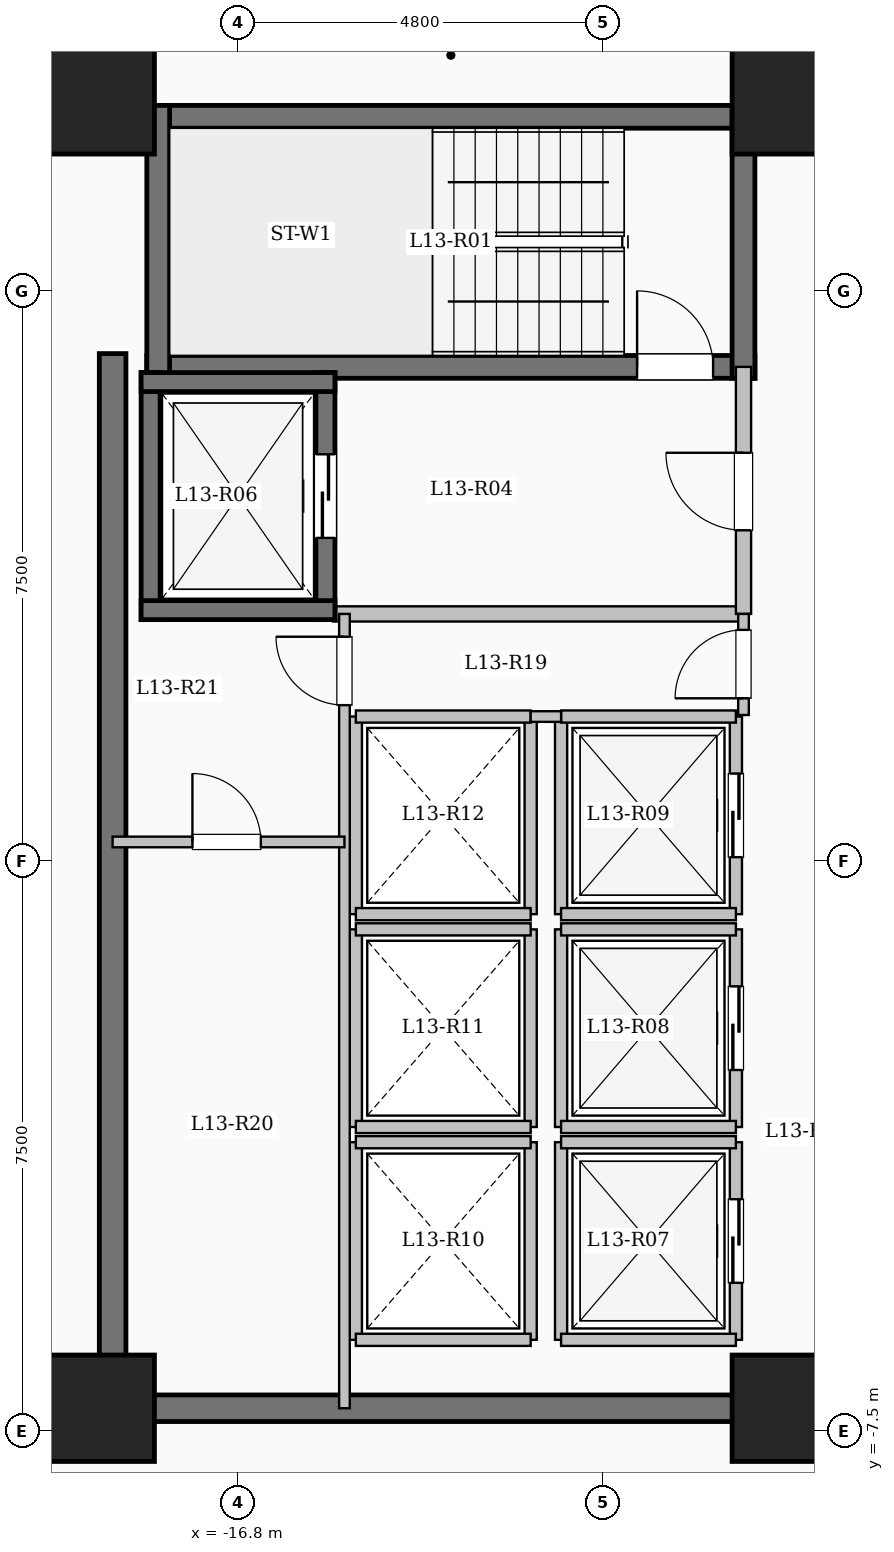
"""IFC4 building model, lengths in metres.
Left out: names, types, materials, properties, quantities, classifications, styles, units other than length and angle.
Written with IfcOpenShell. Run it as: python <this file> out.ifc"""

import sys

from ifc_helpers import new_model, si_unit, direction, frame, frame_2d, origin, origin_2d, place, context, subcontext, project, spatial, rectangle, extrude, element, fill, save


model = new_model("IFC4")
c1 = context("Model", 3, precision=1e-05, world=origin(), true_north=direction((0.0, 1.0)))
c2 = subcontext(c1, "Body", "Model", "MODEL_VIEW")
j1 = project(units=[si_unit("LENGTHUNIT", "METRE"), si_unit("PLANEANGLEUNIT", "RADIAN")], contexts=[c1])
p1 = place(None, origin())
s1 = spatial("IfcSite", under=j1, at=p1, CompositionType="ELEMENT")
p2 = place(p1, origin())
s2 = spatial("IfcBuilding", under=s1, at=p2, CompositionType="ELEMENT")
p3 = place(p2, frame((0.0, 0.0, 50.8)))
s3 = spatial("IfcBuildingStorey", under=s2, at=p3, CompositionType="ELEMENT", Elevation=50.8)
for number, where, z_axis, x_axis in (
    (1, (-9.6, -7.2, 0.0), (0.0, 0.0, 1.0), (1.0, 0.0, 0.0)),
    (2, (-9.6, 10.0, 0.0), (0.0, 0.0, 1.0), (1.0, 0.0, 0.0)),
    (3, (-18.6, -7.2, 0.0), (0.0, 0.0, 1.0), (1.0, 0.0, 0.0)),
    (4, (-18.6, 10.0, 0.0), (0.0, 0.0, 1.0), (1.0, 0.0, 0.0)),
):
    element("IfcColumn", number, at=place(p3, frame(where, z_axis=z_axis, x_axis=x_axis)), inside=s3, PredefinedType="COLUMN", context=c2, shape_type="SweptSolid", body=[
        extrude(rectangle(XDim=1.4, YDim=1.4, at=origin_2d()), origin(), (0.0, 0.0, 1.0), 3.35),
    ])
p4 = place(p3, frame((-18.0, 9.79, 0.0), z_axis=(0.0, 0.0, 1.0), x_axis=(1.0, 0.0, 0.0)))
e5 = element("IfcWall", 5, at=p4, inside=s3, PredefinedType="SHEAR", context=c2, shape_type="SweptSolid", body=[
    extrude(rectangle(XDim=8.0, YDim=0.3, at=frame_2d((4.0, 0.0))), origin(), (0.0, 0.0, 1.0), 3.35),
])
p5 = place(p3, frame((-18.0, 6.5, 0.0), z_axis=(0.0, 0.0, 1.0), x_axis=(1.0, 0.0, 0.0)))
e6 = element("IfcWall", 6, at=p5, inside=s3, PredefinedType="SHEAR", context=c2, shape_type="SweptSolid", body=[
    extrude(rectangle(XDim=8.0, YDim=0.3, at=frame_2d((4.0, 0.0))), origin(), (0.0, 0.0, 1.0), 3.35),
])
p6 = place(p5, frame((6.45, 0.0, 0.0)))
e7 = element("IfcOpeningElement", 7, at=p6, cuts=e6, PredefinedType="OPENING", context=c2, shape_type="SweptSolid", body=[
    extrude(rectangle(XDim=1.0, YDim=2.15, at=frame_2d((0.5, 1.075))), frame((0.0, 0.16, 0.0), z_axis=(0.0, -1.0, 0.0), x_axis=(1.0, 0.0, 0.0)), (0.0, 0.0, 1.0), 0.32),
])
for number, where, z_axis, x_axis in (
    (8, (-17.85, 6.35, 0.0), (0.0, 0.0, 1.0), (0.0, 1.0, 0.0)),
    (9, (-10.15, 6.35, 0.0), (0.0, 0.0, 1.0), (0.0, 1.0, 0.0)),
):
    element("IfcWall", number, at=place(p3, frame(where, z_axis=z_axis, x_axis=x_axis)), inside=s3, PredefinedType="SHEAR", context=c2, shape_type="SweptSolid", body=[
        extrude(rectangle(XDim=3.59, YDim=0.3, at=frame_2d((1.795, 0.0))), origin(), (0.0, 0.0, 1.0), 3.35),
    ])
p7 = place(p3, frame((-15.55, 3.25, 0.0), z_axis=(0.0, 0.0, 1.0), x_axis=(1.0, 0.0, 0.0)))
e10 = element("IfcWall", 10, at=p7, inside=s3, PredefinedType="SOLIDWALL", context=c2, shape_type="SweptSolid", body=[
    extrude(rectangle(XDim=5.4, YDim=0.2, at=frame_2d((2.7, 0.0))), origin(), (0.0, 0.0, 1.0), 3.1),
])
p8 = place(p3, frame((-10.15, 3.25, 0.0), z_axis=(0.0, 0.0, 1.0), x_axis=(0.0, 1.0, 0.0)))
e11 = element("IfcWall", 11, at=p8, inside=s3, PredefinedType="SOLIDWALL", context=c2, shape_type="SweptSolid", body=[
    extrude(rectangle(XDim=3.25, YDim=0.2, at=frame_2d((1.625, 0.0))), origin(), (0.0, 0.0, 1.0), 3.1),
])
p9 = place(p8, frame((1.1, 0.0, 0.0)))
e12 = element("IfcOpeningElement", 12, at=p9, cuts=e11, PredefinedType="OPENING", context=c2, shape_type="SweptSolid", body=[
    extrude(rectangle(XDim=1.02, YDim=2.15, at=frame_2d((0.51, 1.075))), frame((0.0, 0.11, 0.0), z_axis=(0.0, -1.0, 0.0), x_axis=(1.0, 0.0, 0.0)), (0.0, 0.0, 1.0), 0.22),
])
p10 = place(p3, frame((-17.95, 3.175, 0.0), z_axis=(0.0, 0.0, 1.0), x_axis=(0.0, 1.0, 0.0)))
e13 = element("IfcWall", 13, at=p10, inside=s3, PredefinedType="SHEAR", context=c2, shape_type="SweptSolid", body=[
    extrude(rectangle(XDim=3.25, YDim=0.25, at=frame_2d((1.625, 0.0))), origin(), (0.0, 0.0, 1.0), 3.35),
])
p11 = place(p3, frame((-15.65, 3.175, 0.0), z_axis=(0.0, 0.0, 1.0), x_axis=(0.0, 1.0, 0.0)))
e14 = element("IfcWall", 14, at=p11, inside=s3, PredefinedType="SHEAR", context=c2, shape_type="SweptSolid", body=[
    extrude(rectangle(XDim=3.25, YDim=0.25, at=frame_2d((1.625, 0.0))), origin(), (0.0, 0.0, 1.0), 3.35),
])
p12 = place(p11, frame((1.075, 0.0, 0.0)))
e15 = element("IfcOpeningElement", 15, at=p12, cuts=e14, PredefinedType="OPENING", context=c2, shape_type="SweptSolid", body=[
    extrude(rectangle(XDim=1.1, YDim=2.15, at=frame_2d((0.55, 1.075))), frame((0.0, 0.135, 0.0), z_axis=(0.0, -1.0, 0.0), x_axis=(1.0, 0.0, 0.0)), (0.0, 0.0, 1.0), 0.27),
])
for number, where, z_axis, x_axis in (
    (16, (-18.075, 3.3, 0.0), (0.0, 0.0, 1.0), (1.0, 0.0, 0.0)),
    (17, (-18.075, 6.3, 0.0), (0.0, 0.0, 1.0), (1.0, 0.0, 0.0)),
):
    element("IfcWall", number, at=place(p3, frame(where, z_axis=z_axis, x_axis=x_axis)), inside=s3, PredefinedType="SHEAR", context=c2, shape_type="SweptSolid", body=[
        extrude(rectangle(XDim=2.55, YDim=0.25, at=frame_2d((1.275, 0.0))), origin(), (0.0, 0.0, 1.0), 3.35),
    ])
p13 = place(p3, frame((-12.55, -6.3, 0.0), z_axis=(0.0, 0.0, 1.0), x_axis=(0.0, 1.0, 0.0)))
e18 = element("IfcWall", 18, at=p13, inside=s3, PredefinedType="SOLIDWALL", context=c2, shape_type="SweptSolid", body=[
    extrude(rectangle(XDim=2.6, YDim=0.16, at=frame_2d((1.3, 0.0))), origin(), (0.0, 0.0, 1.0), 3.1),
])
p14 = place(p3, frame((-10.25, -6.3, 0.0), z_axis=(0.0, 0.0, 1.0), x_axis=(0.0, 1.0, 0.0)))
e19 = element("IfcWall", 19, at=p14, inside=s3, PredefinedType="SOLIDWALL", context=c2, shape_type="SweptSolid", body=[
    extrude(rectangle(XDim=2.6, YDim=0.16, at=frame_2d((1.3, 0.0))), origin(), (0.0, 0.0, 1.0), 3.1),
])
p15 = place(p14, frame((0.75, 0.0, 0.0)))
e20 = element("IfcOpeningElement", 20, at=p15, cuts=e19, PredefinedType="OPENING", context=c2, shape_type="SweptSolid", body=[
    extrude(rectangle(XDim=1.1, YDim=2.15, at=frame_2d((0.55, 1.075))), frame((0.0, 0.09, 0.0), z_axis=(0.0, -1.0, 0.0), x_axis=(1.0, 0.0, 0.0)), (0.0, 0.0, 1.0), 0.18),
])
for number, where, z_axis, x_axis in (
    (21, (-12.55, -6.3, 0.0), (0.0, 0.0, 1.0), (1.0, 0.0, 0.0)),
    (22, (-12.55, -3.7, 0.0), (0.0, 0.0, 1.0), (1.0, 0.0, 0.0)),
):
    element("IfcWall", number, at=place(p3, frame(where, z_axis=z_axis, x_axis=x_axis)), inside=s3, PredefinedType="SOLIDWALL", context=c2, shape_type="SweptSolid", body=[
        extrude(rectangle(XDim=2.3, YDim=0.16, at=frame_2d((1.15, 0.0))), origin(), (0.0, 0.0, 1.0), 3.1),
    ])
p16 = place(p3, frame((-12.55, -3.5, 0.0), z_axis=(0.0, 0.0, 1.0), x_axis=(0.0, 1.0, 0.0)))
e23 = element("IfcWall", 23, at=p16, inside=s3, PredefinedType="SOLIDWALL", context=c2, shape_type="SweptSolid", body=[
    extrude(rectangle(XDim=2.6, YDim=0.16, at=frame_2d((1.3, 0.0))), origin(), (0.0, 0.0, 1.0), 3.1),
])
p17 = place(p3, frame((-10.25, -3.5, 0.0), z_axis=(0.0, 0.0, 1.0), x_axis=(0.0, 1.0, 0.0)))
e24 = element("IfcWall", 24, at=p17, inside=s3, PredefinedType="SOLIDWALL", context=c2, shape_type="SweptSolid", body=[
    extrude(rectangle(XDim=2.6, YDim=0.16, at=frame_2d((1.3, 0.0))), origin(), (0.0, 0.0, 1.0), 3.1),
])
p18 = place(p17, frame((0.75, 0.0, 0.0)))
e25 = element("IfcOpeningElement", 25, at=p18, cuts=e24, PredefinedType="OPENING", context=c2, shape_type="SweptSolid", body=[
    extrude(rectangle(XDim=1.1, YDim=2.15, at=frame_2d((0.55, 1.075))), frame((0.0, 0.09, 0.0), z_axis=(0.0, -1.0, 0.0), x_axis=(1.0, 0.0, 0.0)), (0.0, 0.0, 1.0), 0.18),
])
for number, where, z_axis, x_axis in (
    (26, (-12.55, -3.5, 0.0), (0.0, 0.0, 1.0), (1.0, 0.0, 0.0)),
    (27, (-12.55, -0.9, 0.0), (0.0, 0.0, 1.0), (1.0, 0.0, 0.0)),
):
    element("IfcWall", number, at=place(p3, frame(where, z_axis=z_axis, x_axis=x_axis)), inside=s3, PredefinedType="SOLIDWALL", context=c2, shape_type="SweptSolid", body=[
        extrude(rectangle(XDim=2.3, YDim=0.16, at=frame_2d((1.15, 0.0))), origin(), (0.0, 0.0, 1.0), 3.1),
    ])
p19 = place(p3, frame((-12.55, -0.7, 0.0), z_axis=(0.0, 0.0, 1.0), x_axis=(0.0, 1.0, 0.0)))
e28 = element("IfcWall", 28, at=p19, inside=s3, PredefinedType="SOLIDWALL", context=c2, shape_type="SweptSolid", body=[
    extrude(rectangle(XDim=2.6, YDim=0.16, at=frame_2d((1.3, 0.0))), origin(), (0.0, 0.0, 1.0), 3.1),
])
p20 = place(p3, frame((-10.25, -0.7, 0.0), z_axis=(0.0, 0.0, 1.0), x_axis=(0.0, 1.0, 0.0)))
e29 = element("IfcWall", 29, at=p20, inside=s3, PredefinedType="SOLIDWALL", context=c2, shape_type="SweptSolid", body=[
    extrude(rectangle(XDim=2.6, YDim=0.16, at=frame_2d((1.3, 0.0))), origin(), (0.0, 0.0, 1.0), 3.1),
])
p21 = place(p20, frame((0.75, 0.0, 0.0)))
e30 = element("IfcOpeningElement", 30, at=p21, cuts=e29, PredefinedType="OPENING", context=c2, shape_type="SweptSolid", body=[
    extrude(rectangle(XDim=1.1, YDim=2.15, at=frame_2d((0.55, 1.075))), frame((0.0, 0.09, 0.0), z_axis=(0.0, -1.0, 0.0), x_axis=(1.0, 0.0, 0.0)), (0.0, 0.0, 1.0), 0.18),
])
for number, where, z_axis, x_axis in (
    (31, (-12.55, -0.7, 0.0), (0.0, 0.0, 1.0), (1.0, 0.0, 0.0)),
    (32, (-12.55, 1.9, 0.0), (0.0, 0.0, 1.0), (1.0, 0.0, 0.0)),
):
    element("IfcWall", number, at=place(p3, frame(where, z_axis=z_axis, x_axis=x_axis)), inside=s3, PredefinedType="SOLIDWALL", context=c2, shape_type="SweptSolid", body=[
        extrude(rectangle(XDim=2.3, YDim=0.16, at=frame_2d((1.15, 0.0))), origin(), (0.0, 0.0, 1.0), 3.1),
    ])
for number, where, z_axis, x_axis in (
    (33, (-15.25, -6.3, 0.0), (0.0, 0.0, 1.0), (0.0, 1.0, 0.0)),
    (34, (-12.95, -6.3, 0.0), (0.0, 0.0, 1.0), (0.0, 1.0, 0.0)),
):
    element("IfcWall", number, at=place(p3, frame(where, z_axis=z_axis, x_axis=x_axis)), inside=s3, PredefinedType="SOLIDWALL", context=c2, shape_type="SweptSolid", body=[
        extrude(rectangle(XDim=2.6, YDim=0.16, at=frame_2d((1.3, 0.0))), origin(), (0.0, 0.0, 1.0), 3.1),
    ])
for number, where, z_axis, x_axis in (
    (35, (-15.25, -6.3, 0.0), (0.0, 0.0, 1.0), (1.0, 0.0, 0.0)),
    (36, (-15.25, -3.7, 0.0), (0.0, 0.0, 1.0), (1.0, 0.0, 0.0)),
):
    element("IfcWall", number, at=place(p3, frame(where, z_axis=z_axis, x_axis=x_axis)), inside=s3, PredefinedType="SOLIDWALL", context=c2, shape_type="SweptSolid", body=[
        extrude(rectangle(XDim=2.3, YDim=0.16, at=frame_2d((1.15, 0.0))), origin(), (0.0, 0.0, 1.0), 3.1),
    ])
for number, where, z_axis, x_axis in (
    (37, (-15.25, -3.5, 0.0), (0.0, 0.0, 1.0), (0.0, 1.0, 0.0)),
    (38, (-12.95, -3.5, 0.0), (0.0, 0.0, 1.0), (0.0, 1.0, 0.0)),
):
    element("IfcWall", number, at=place(p3, frame(where, z_axis=z_axis, x_axis=x_axis)), inside=s3, PredefinedType="SOLIDWALL", context=c2, shape_type="SweptSolid", body=[
        extrude(rectangle(XDim=2.6, YDim=0.16, at=frame_2d((1.3, 0.0))), origin(), (0.0, 0.0, 1.0), 3.1),
    ])
for number, where, z_axis, x_axis in (
    (39, (-15.25, -3.5, 0.0), (0.0, 0.0, 1.0), (1.0, 0.0, 0.0)),
    (40, (-15.25, -0.9, 0.0), (0.0, 0.0, 1.0), (1.0, 0.0, 0.0)),
):
    element("IfcWall", number, at=place(p3, frame(where, z_axis=z_axis, x_axis=x_axis)), inside=s3, PredefinedType="SOLIDWALL", context=c2, shape_type="SweptSolid", body=[
        extrude(rectangle(XDim=2.3, YDim=0.16, at=frame_2d((1.15, 0.0))), origin(), (0.0, 0.0, 1.0), 3.1),
    ])
for number, where, z_axis, x_axis in (
    (41, (-15.25, -0.7, 0.0), (0.0, 0.0, 1.0), (0.0, 1.0, 0.0)),
    (42, (-12.95, -0.7, 0.0), (0.0, 0.0, 1.0), (0.0, 1.0, 0.0)),
):
    element("IfcWall", number, at=place(p3, frame(where, z_axis=z_axis, x_axis=x_axis)), inside=s3, PredefinedType="SOLIDWALL", context=c2, shape_type="SweptSolid", body=[
        extrude(rectangle(XDim=2.6, YDim=0.16, at=frame_2d((1.3, 0.0))), origin(), (0.0, 0.0, 1.0), 3.1),
    ])
for number, where, z_axis, x_axis in (
    (43, (-15.25, -0.7, 0.0), (0.0, 0.0, 1.0), (1.0, 0.0, 0.0)),
    (44, (-15.25, 1.9, 0.0), (0.0, 0.0, 1.0), (1.0, 0.0, 0.0)),
):
    element("IfcWall", number, at=place(p3, frame(where, z_axis=z_axis, x_axis=x_axis)), inside=s3, PredefinedType="SOLIDWALL", context=c2, shape_type="SweptSolid", body=[
        extrude(rectangle(XDim=2.3, YDim=0.16, at=frame_2d((1.15, 0.0))), origin(), (0.0, 0.0, 1.0), 3.1),
    ])
p22 = place(p3, frame((-18.45, -7.375, 0.0), z_axis=(0.0, 0.0, 1.0), x_axis=(0.0, 1.0, 0.0)))
e45 = element("IfcWall", 45, at=p22, inside=s3, PredefinedType="SHEAR", context=c2, shape_type="SweptSolid", body=[
    extrude(rectangle(XDim=14.05, YDim=0.35, at=frame_2d((7.025, 0.0))), origin(), (0.0, 0.0, 1.0), 3.35),
])
p23 = place(p3, frame((-18.625, -7.2, 0.0), z_axis=(0.0, 0.0, 1.0), x_axis=(1.0, 0.0, 0.0)))
e46 = element("IfcWall", 46, at=p23, inside=s3, PredefinedType="SHEAR", context=c2, shape_type="SweptSolid", body=[
    extrude(rectangle(XDim=8.55, YDim=0.35, at=frame_2d((4.275, 0.0))), origin(), (0.0, 0.0, 1.0), 3.35),
])
p24 = place(p3, frame((-12.95, 1.9, 0.0), z_axis=(0.0, 0.0, 1.0), x_axis=(1.0, 0.0, 0.0)))
e47 = element("IfcWall", 47, at=p24, inside=s3, PredefinedType="PARTITIONING", context=c2, shape_type="SweptSolid", body=[
    extrude(rectangle(XDim=0.4, YDim=0.14, at=frame_2d((0.2, 0.0))), origin(), (0.0, 0.0, 1.0), 3.1),
])
p25 = place(p3, frame((-10.15, 1.92, 0.0), z_axis=(0.0, 0.0, 1.0), x_axis=(0.0, 1.0, 0.0)))
e48 = element("IfcWall", 48, at=p25, inside=s3, PredefinedType="PARTITIONING", context=c2, shape_type="SweptSolid", body=[
    extrude(rectangle(XDim=1.33, YDim=0.14, at=frame_2d((0.665, 0.0))), origin(), (0.0, 0.0, 1.0), 3.1),
])
p26 = place(p25, frame((0.22, 0.0, 0.0)))
e49 = element("IfcOpeningElement", 49, at=p26, cuts=e48, PredefinedType="OPENING", context=c2, shape_type="SweptSolid", body=[
    extrude(rectangle(XDim=0.9, YDim=2.08, at=frame_2d((0.45, 1.04))), frame((0.0, 0.08, 0.0), z_axis=(0.0, -1.0, 0.0), x_axis=(1.0, 0.0, 0.0)), (0.0, 0.0, 1.0), 0.16),
])
p27 = place(p3, frame((-15.4, -7.2, 0.0), z_axis=(0.0, 0.0, 1.0), x_axis=(0.0, 1.0, 0.0)))
e50 = element("IfcWall", 50, at=p27, inside=s3, PredefinedType="PARTITIONING", context=c2, shape_type="SweptSolid", body=[
    extrude(rectangle(XDim=10.45, YDim=0.14, at=frame_2d((5.225, 0.0))), origin(), (0.0, 0.0, 1.0), 3.1),
])
p28 = place(p27, frame((9.25, 0.0, 0.0)))
e51 = element("IfcOpeningElement", 51, at=p28, cuts=e50, PredefinedType="OPENING", context=c2, shape_type="SweptSolid", body=[
    extrude(rectangle(XDim=0.9, YDim=2.08, at=frame_2d((0.45, 1.04))), frame((0.0, 0.08, 0.0), z_axis=(0.0, -1.0, 0.0), x_axis=(1.0, 0.0, 0.0)), (0.0, 0.0, 1.0), 0.16),
])
p29 = place(p3, frame((-18.45, 0.25, 0.0), z_axis=(0.0, 0.0, 1.0), x_axis=(1.0, 0.0, 0.0)))
e52 = element("IfcWall", 52, at=p29, inside=s3, PredefinedType="PARTITIONING", context=c2, shape_type="SweptSolid", body=[
    extrude(rectangle(XDim=3.05, YDim=0.14, at=frame_2d((1.525, 0.0))), origin(), (0.0, 0.0, 1.0), 3.1),
])
p30 = place(p29, frame((1.05, 0.0, 0.0)))
e53 = element("IfcOpeningElement", 53, at=p30, cuts=e52, PredefinedType="OPENING", context=c2, shape_type="SweptSolid", body=[
    extrude(rectangle(XDim=0.9, YDim=2.08, at=frame_2d((0.45, 1.04))), frame((0.0, 0.08, 0.0), z_axis=(0.0, -1.0, 0.0), x_axis=(1.0, 0.0, 0.0)), (0.0, 0.0, 1.0), 0.16),
])
p31 = place(p3, frame((-28.68, -7.25, 0.0), z_axis=(0.0, 0.0, 1.0), x_axis=(1.0, 0.0, 0.0)))
e54 = element("IfcWall", 54, at=p31, inside=s3, PredefinedType="PARTITIONING", context=c2, shape_type="SweptSolid", body=[
    extrude(rectangle(XDim=10.23, YDim=0.15, at=frame_2d((5.115, 0.0))), origin(), (0.0, 0.0, 1.0), 3.1),
])
p32 = place(p31, frame((7.03, 0.0, 0.0)))
e55 = element("IfcOpeningElement", 55, at=p32, cuts=e54, PredefinedType="OPENING", context=c2, shape_type="SweptSolid", body=[
    extrude(rectangle(XDim=1.08, YDim=2.15, at=frame_2d((0.54, 1.075))), frame((0.0, 0.085, 0.0), z_axis=(0.0, -1.0, 0.0), x_axis=(1.0, 0.0, 0.0)), (0.0, 0.0, 1.0), 0.17),
])
p33 = place(p6, origin())
e56 = element("IfcDoor", 56, at=p33, inside=s3, OperationType="SINGLE_SWING_LEFT", PredefinedType="DOOR", context=c2, shape_type="SweptSolid", body=[
    extrude(rectangle(XDim=1.0, YDim=2.15, at=frame_2d((0.5, 1.075))), frame((0.0, 0.025, 0.0), z_axis=(0.0, -1.0, 0.0), x_axis=(1.0, 0.0, 0.0)), (0.0, 0.0, 1.0), 0.05),
])
fill(e7, e56)
p34 = place(p9, origin())
e57 = element("IfcDoor", 57, at=p34, inside=s3, OperationType="SINGLE_SWING_RIGHT", PredefinedType="DOOR", context=c2, shape_type="SweptSolid", body=[
    extrude(rectangle(XDim=1.02, YDim=2.15, at=frame_2d((0.51, 1.075))), frame((0.0, 0.025, 0.0), z_axis=(0.0, -1.0, 0.0), x_axis=(1.0, 0.0, 0.0)), (0.0, 0.0, 1.0), 0.05),
])
fill(e12, e57)
p35 = place(p12, origin())
e58 = element("IfcDoor", 58, at=p35, inside=s3, OperationType="SLIDING_TO_LEFT", PredefinedType="DOOR", context=c2, shape_type="SweptSolid", body=[
    extrude(rectangle(XDim=1.1, YDim=2.15, at=frame_2d((0.55, 1.075))), frame((0.0, 0.025, 0.0), z_axis=(0.0, -1.0, 0.0), x_axis=(1.0, 0.0, 0.0)), (0.0, 0.0, 1.0), 0.05),
])
fill(e15, e58)
p36 = place(p15, origin())
e59 = element("IfcDoor", 59, at=p36, inside=s3, OperationType="SLIDING_TO_LEFT", PredefinedType="DOOR", context=c2, shape_type="SweptSolid", body=[
    extrude(rectangle(XDim=1.1, YDim=2.15, at=frame_2d((0.55, 1.075))), frame((0.0, 0.025, 0.0), z_axis=(0.0, -1.0, 0.0), x_axis=(1.0, 0.0, 0.0)), (0.0, 0.0, 1.0), 0.05),
])
fill(e20, e59)
p37 = place(p18, origin())
e60 = element("IfcDoor", 60, at=p37, inside=s3, OperationType="SLIDING_TO_LEFT", PredefinedType="DOOR", context=c2, shape_type="SweptSolid", body=[
    extrude(rectangle(XDim=1.1, YDim=2.15, at=frame_2d((0.55, 1.075))), frame((0.0, 0.025, 0.0), z_axis=(0.0, -1.0, 0.0), x_axis=(1.0, 0.0, 0.0)), (0.0, 0.0, 1.0), 0.05),
])
fill(e25, e60)
p38 = place(p21, origin())
e61 = element("IfcDoor", 61, at=p38, inside=s3, OperationType="SLIDING_TO_LEFT", PredefinedType="DOOR", context=c2, shape_type="SweptSolid", body=[
    extrude(rectangle(XDim=1.1, YDim=2.15, at=frame_2d((0.55, 1.075))), frame((0.0, 0.025, 0.0), z_axis=(0.0, -1.0, 0.0), x_axis=(1.0, 0.0, 0.0)), (0.0, 0.0, 1.0), 0.05),
])
fill(e30, e61)
p39 = place(p26, origin())
e62 = element("IfcDoor", 62, at=p39, inside=s3, OperationType="SINGLE_SWING_LEFT", PredefinedType="DOOR", context=c2, shape_type="SweptSolid", body=[
    extrude(rectangle(XDim=0.9, YDim=2.08, at=frame_2d((0.45, 1.04))), frame((0.0, 0.025, 0.0), z_axis=(0.0, -1.0, 0.0), x_axis=(1.0, 0.0, 0.0)), (0.0, 0.0, 1.0), 0.05),
])
fill(e49, e62)
p40 = place(p28, origin())
e63 = element("IfcDoor", 63, at=p40, inside=s3, OperationType="SINGLE_SWING_RIGHT", PredefinedType="DOOR", context=c2, shape_type="SweptSolid", body=[
    extrude(rectangle(XDim=0.9, YDim=2.08, at=frame_2d((0.45, 1.04))), frame((0.0, 0.025, 0.0), z_axis=(0.0, -1.0, 0.0), x_axis=(1.0, 0.0, 0.0)), (0.0, 0.0, 1.0), 0.05),
])
fill(e51, e63)
p41 = place(p30, origin())
e64 = element("IfcDoor", 64, at=p41, inside=s3, OperationType="SINGLE_SWING_LEFT", PredefinedType="DOOR", context=c2, shape_type="SweptSolid", body=[
    extrude(rectangle(XDim=0.9, YDim=2.08, at=frame_2d((0.45, 1.04))), frame((0.0, 0.025, 0.0), z_axis=(0.0, -1.0, 0.0), x_axis=(1.0, 0.0, 0.0)), (0.0, 0.0, 1.0), 0.05),
])
fill(e53, e64)
save(model, sys.argv[1])
